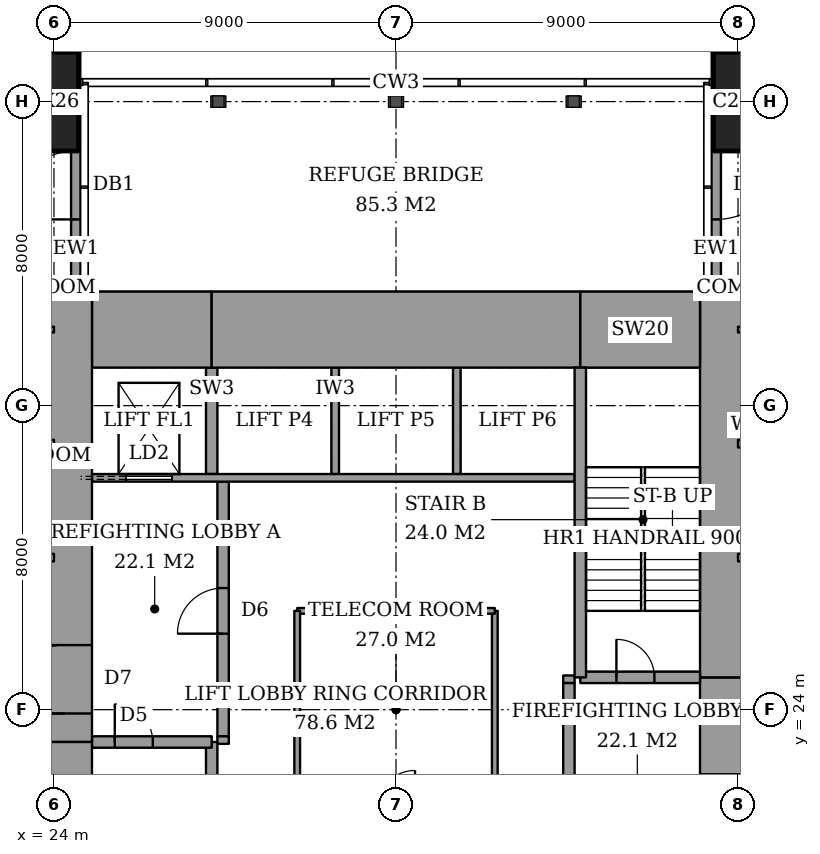
"""IFC4 building model, lengths in metres.
Left out: names, types, materials, properties, quantities, classifications, styles, units other than length and angle.
Written with IfcOpenShell. Run it as: python <this file> out.ifc"""

import sys

from ifc_helpers import new_model, si_unit, direction, frame, frame_2d, origin, origin_2d, place, context, subcontext, project, spatial, rectangle, extrude, element, fill, save


model = new_model("IFC4")
c1 = context("Model", 3, precision=1e-05, world=origin(), true_north=direction((0.0, 1.0)))
c2 = subcontext(c1, "Body", "Model", "MODEL_VIEW")
j1 = project(units=[si_unit("LENGTHUNIT", "METRE"), si_unit("PLANEANGLEUNIT", "RADIAN")], contexts=[c1])
p1 = place(None, origin())
s1 = spatial("IfcSite", under=j1, at=p1, CompositionType="ELEMENT")
p2 = place(p1, origin())
s2 = spatial("IfcBuilding", under=s1, at=p2, CompositionType="ELEMENT")
p3 = place(p2, frame((0.0, 0.0, 90.8)))
s3 = spatial("IfcBuildingStorey", under=s2, at=p3, CompositionType="ELEMENT", Elevation=90.8)
for number, where, z_axis, x_axis in (
    (1, (23.65, 40.0, 0.0), (0.0, 0.0, 1.0), (1.0, 0.0, 0.0)),
    (2, (42.35, 40.0, 0.0), (0.0, 0.0, 1.0), (1.0, 0.0, 0.0)),
):
    element("IfcColumn", number, at=place(p3, frame(where, z_axis=z_axis, x_axis=x_axis)), inside=s3, PredefinedType="COLUMN", context=c2, shape_type="SweptSolid", body=[
        extrude(rectangle(XDim=2.0, YDim=2.6, at=origin_2d()), origin(), (0.0, 0.0, 1.0), 5.4),
    ])
p4 = place(p3, frame((25.0, 34.0, 0.0), z_axis=(0.0, 0.0, 1.0), x_axis=(1.0, 0.0, 0.0)))
e3 = element("IfcWall", 3, at=p4, inside=s3, PredefinedType="SHEAR", context=c2, shape_type="SweptSolid", body=[
    extrude(rectangle(XDim=3.15, YDim=2.0, at=frame_2d((1.575, 0.0))), origin(), (0.0, 0.0, 1.0), 5.4),
])
p5 = place(p3, frame((28.15, 34.0, 0.0), z_axis=(0.0, 0.0, 1.0), x_axis=(1.0, 0.0, 0.0)))
e4 = element("IfcWall", 4, at=p5, inside=s3, PredefinedType="SHEAR", context=c2, shape_type="SweptSolid", body=[
    extrude(rectangle(XDim=9.7, YDim=2.0, at=frame_2d((4.85, 0.0))), origin(), (0.0, 0.0, 1.0), 5.4),
])
p6 = place(p3, frame((37.85, 34.0, 0.0), z_axis=(0.0, 0.0, 1.0), x_axis=(1.0, 0.0, 0.0)))
e5 = element("IfcWall", 5, at=p6, inside=s3, PredefinedType="SHEAR", context=c2, shape_type="SweptSolid", body=[
    extrude(rectangle(XDim=3.15, YDim=2.0, at=frame_2d((1.575, 0.0))), origin(), (0.0, 0.0, 1.0), 5.4),
])
p7 = place(p3, frame((24.3, 13.0, 0.0), z_axis=(0.0, 0.0, 1.0), x_axis=(0.0, 1.0, 0.0)))
e6 = element("IfcWall", 6, at=p7, inside=s3, PredefinedType="SHEAR", context=c2, shape_type="SweptSolid", body=[
    extrude(rectangle(XDim=10.15, YDim=1.4, at=frame_2d((5.075, 0.0))), origin(), (0.0, 0.0, 1.0), 5.4),
])
p8 = place(p3, frame((24.3, 23.15, 0.0), z_axis=(0.0, 0.0, 1.0), x_axis=(0.0, 1.0, 0.0)))
e7 = element("IfcWall", 7, at=p8, inside=s3, PredefinedType="SHEAR", context=c2, shape_type="SweptSolid", body=[
    extrude(rectangle(XDim=11.85, YDim=1.4, at=frame_2d((5.925, 0.0))), origin(), (0.0, 0.0, 1.0), 5.4),
])
p9 = place(p8, frame((0.75, 0.0, 0.0)))
e8 = element("IfcOpeningElement", 8, at=p9, cuts=e7, PredefinedType="OPENING", context=c2, shape_type="SweptSolid", body=[
    extrude(rectangle(XDim=1.8, YDim=2.4, at=frame_2d((0.9, 1.2))), frame((0.0, 0.71, 0.0), z_axis=(0.0, -1.0, 0.0), x_axis=(1.0, 0.0, 0.0)), (0.0, 0.0, 1.0), 1.42),
])
p10 = place(p3, frame((41.7, 13.0, 0.0), z_axis=(0.0, 0.0, 1.0), x_axis=(0.0, 1.0, 0.0)))
e9 = element("IfcWall", 9, at=p10, inside=s3, PredefinedType="SHEAR", context=c2, shape_type="SweptSolid", body=[
    extrude(rectangle(XDim=11.85, YDim=1.4, at=frame_2d((5.925, 0.0))), origin(), (0.0, 0.0, 1.0), 5.4),
])
p11 = place(p10, frame((7.5, 0.0, 0.0)))
e10 = element("IfcOpeningElement", 10, at=p11, cuts=e9, PredefinedType="OPENING", context=c2, shape_type="SweptSolid", body=[
    extrude(rectangle(XDim=1.8, YDim=2.4, at=frame_2d((0.9, 1.2))), frame((0.0, 0.71, 0.0), z_axis=(0.0, -1.0, 0.0), x_axis=(1.0, 0.0, 0.0)), (0.0, 0.0, 1.0), 1.42),
])
p12 = place(p3, frame((41.7, 24.85, 0.0), z_axis=(0.0, 0.0, 1.0), x_axis=(0.0, 1.0, 0.0)))
e11 = element("IfcWall", 11, at=p12, inside=s3, PredefinedType="SHEAR", context=c2, shape_type="SweptSolid", body=[
    extrude(rectangle(XDim=10.15, YDim=1.4, at=frame_2d((5.075, 0.0))), origin(), (0.0, 0.0, 1.0), 5.4),
])
p13 = place(p3, frame((28.15, 15.0, 0.0), z_axis=(0.0, 0.0, 1.0), x_axis=(0.0, 1.0, 0.0)))
e12 = element("IfcWall", 12, at=p13, inside=s3, PredefinedType="SHEAR", context=c2, shape_type="SweptSolid", body=[
    extrude(rectangle(XDim=8.15, YDim=0.3, at=frame_2d((4.075, 0.0))), origin(), (0.0, 0.0, 1.0), 5.4),
])
p14 = place(p3, frame((25.0, 23.15, 0.0), z_axis=(0.0, 0.0, 1.0), x_axis=(1.0, 0.0, 0.0)))
e13 = element("IfcWall", 13, at=p14, inside=s3, PredefinedType="SHEAR", context=c2, shape_type="SweptSolid", body=[
    extrude(rectangle(XDim=3.15, YDim=0.3, at=frame_2d((1.575, 0.0))), origin(), (0.0, 0.0, 1.0), 5.4),
])
p15 = place(p14, frame((0.6, 0.0, 0.0)))
e14 = element("IfcOpeningElement", 14, at=p15, cuts=e13, PredefinedType="OPENING", context=c2, shape_type="SweptSolid", body=[
    extrude(rectangle(XDim=1.0, YDim=2.1, at=frame_2d((0.5, 1.05))), frame((0.0, 0.16, 0.0), z_axis=(0.0, -1.0, 0.0), x_axis=(1.0, 0.0, 0.0)), (0.0, 0.0, 1.0), 0.32),
])
p16 = place(p3, frame((37.85, 24.85, 0.0), z_axis=(0.0, 0.0, 1.0), x_axis=(0.0, 1.0, 0.0)))
e15 = element("IfcWall", 15, at=p16, inside=s3, PredefinedType="SHEAR", context=c2, shape_type="SweptSolid", body=[
    extrude(rectangle(XDim=8.15, YDim=0.3, at=frame_2d((4.075, 0.0))), origin(), (0.0, 0.0, 1.0), 5.4),
])
p17 = place(p3, frame((37.85, 24.85, 0.0), z_axis=(0.0, 0.0, 1.0), x_axis=(1.0, 0.0, 0.0)))
e16 = element("IfcWall", 16, at=p17, inside=s3, PredefinedType="SHEAR", context=c2, shape_type="SweptSolid", body=[
    extrude(rectangle(XDim=3.15, YDim=0.3, at=frame_2d((1.575, 0.0))), origin(), (0.0, 0.0, 1.0), 5.4),
])
p18 = place(p17, frame((0.95, 0.0, 0.0)))
e17 = element("IfcOpeningElement", 17, at=p18, cuts=e16, PredefinedType="OPENING", context=c2, shape_type="SweptSolid", body=[
    extrude(rectangle(XDim=1.0, YDim=2.1, at=frame_2d((0.5, 1.05))), frame((0.0, 0.16, 0.0), z_axis=(0.0, -1.0, 0.0), x_axis=(1.0, 0.0, 0.0)), (0.0, 0.0, 1.0), 0.32),
])
p19 = place(p3, frame((28.45, 23.3, 0.0), z_axis=(0.0, 0.0, 1.0), x_axis=(0.0, 1.0, 0.0)))
e18 = element("IfcWall", 18, at=p19, inside=s3, PredefinedType="PARTITIONING", context=c2, shape_type="SweptSolid", body=[
    extrude(rectangle(XDim=6.7, YDim=0.3, at=frame_2d((3.35, 0.0))), origin(), (0.0, 0.0, 1.0), 5.4),
])
p20 = place(p19, frame((2.7, 0.0, 0.0)))
e19 = element("IfcOpeningElement", 19, at=p20, cuts=e18, PredefinedType="OPENING", context=c2, shape_type="SweptSolid", body=[
    extrude(rectangle(XDim=1.2, YDim=2.1, at=frame_2d((0.6, 1.05))), frame((0.0, 0.16, 0.0), z_axis=(0.0, -1.0, 0.0), x_axis=(1.0, 0.0, 0.0)), (0.0, 0.0, 1.0), 0.32),
])
p21 = place(p3, frame((37.55, 18.0, 0.0), z_axis=(0.0, 0.0, 1.0), x_axis=(0.0, 1.0, 0.0)))
e20 = element("IfcWall", 20, at=p21, inside=s3, PredefinedType="PARTITIONING", context=c2, shape_type="SweptSolid", body=[
    extrude(rectangle(XDim=6.7, YDim=0.3, at=frame_2d((3.35, 0.0))), origin(), (0.0, 0.0, 1.0), 5.4),
])
p22 = place(p21, frame((2.8, 0.0, 0.0)))
e21 = element("IfcOpeningElement", 21, at=p22, cuts=e20, PredefinedType="OPENING", context=c2, shape_type="SweptSolid", body=[
    extrude(rectangle(XDim=1.2, YDim=2.1, at=frame_2d((0.6, 1.05))), frame((0.0, 0.16, 0.0), z_axis=(0.0, -1.0, 0.0), x_axis=(1.0, 0.0, 0.0)), (0.0, 0.0, 1.0), 0.32),
])
p23 = place(p3, frame((41.425, 40.6, 0.0), z_axis=(0.0, 0.0, 1.0), x_axis=(0.0, -1.0, 0.0)))
e22 = element("IfcWall", 22, at=p23, inside=s3, PredefinedType="SOLIDWALL", context=c2, shape_type="SweptSolid", body=[
    extrude(rectangle(XDim=5.6, YDim=0.25, at=frame_2d((2.8, 0.0))), origin(), (0.0, 0.0, 1.0), 5.4),
])
p24 = place(p23, frame((1.9, 0.0, 0.0)))
e23 = element("IfcOpeningElement", 23, at=p24, cuts=e22, PredefinedType="OPENING", context=c2, shape_type="SweptSolid", body=[
    extrude(rectangle(XDim=1.8, YDim=2.4, at=frame_2d((0.9, 1.2))), frame((0.0, 0.135, 0.0), z_axis=(0.0, -1.0, 0.0), x_axis=(1.0, 0.0, 0.0)), (0.0, 0.0, 1.0), 0.27),
])
p25 = place(p3, frame((24.575, 35.0, 0.0), z_axis=(0.0, 0.0, 1.0), x_axis=(0.0, 1.0, 0.0)))
e24 = element("IfcWall", 24, at=p25, inside=s3, PredefinedType="SOLIDWALL", context=c2, shape_type="SweptSolid", body=[
    extrude(rectangle(XDim=5.6, YDim=0.25, at=frame_2d((2.8, 0.0))), origin(), (0.0, 0.0, 1.0), 5.4),
])
p26 = place(p25, frame((1.9, 0.0, 0.0)))
e25 = element("IfcOpeningElement", 25, at=p26, cuts=e24, PredefinedType="OPENING", context=c2, shape_type="SweptSolid", body=[
    extrude(rectangle(XDim=1.8, YDim=2.4, at=frame_2d((0.9, 1.2))), frame((0.0, 0.135, 0.0), z_axis=(0.0, -1.0, 0.0), x_axis=(1.0, 0.0, 0.0)), (0.0, 0.0, 1.0), 0.27),
])
for number, where, z_axis, x_axis in (
    (26, (18.9, 28.0, 0.0), (0.0, 0.0, 1.0), (1.0, 0.0, 0.0)),
    (27, (42.0, 28.0, 0.0), (0.0, 0.0, 1.0), (1.0, 0.0, 0.0)),
    (28, (18.9, 31.0, 0.0), (0.0, 0.0, 1.0), (1.0, 0.0, 0.0)),
    (29, (42.0, 31.0, 0.0), (0.0, 0.0, 1.0), (1.0, 0.0, 0.0)),
):
    element("IfcWall", number, at=place(p3, frame(where, z_axis=z_axis, x_axis=x_axis)), inside=s3, PredefinedType="PARTITIONING", context=c2, shape_type="SweptSolid", body=[
        extrude(rectangle(XDim=5.1, YDim=0.2, at=frame_2d((2.55, 0.0))), origin(), (0.0, 0.0, 1.0), 5.15),
    ])
p27 = place(p3, frame((12.0, 34.0, 0.0), z_axis=(0.0, 0.0, 1.0), x_axis=(1.0, 0.0, 0.0)))
e30 = element("IfcWall", 30, at=p27, inside=s3, PredefinedType="PARTITIONING", context=c2, shape_type="SweptSolid", body=[
    extrude(rectangle(XDim=12.0, YDim=0.15, at=frame_2d((6.0, 0.0))), origin(), (0.0, 0.0, 1.0), 5.15),
])
p28 = place(p27, frame((1.65, 0.0, 0.0)))
e31 = element("IfcOpeningElement", 31, at=p28, cuts=e30, PredefinedType="OPENING", context=c2, shape_type="SweptSolid", body=[
    extrude(rectangle(XDim=1.0, YDim=2.1, at=frame_2d((0.5, 1.05))), frame((0.0, 0.085, 0.0), z_axis=(0.0, -1.0, 0.0), x_axis=(1.0, 0.0, 0.0)), (0.0, 0.0, 1.0), 0.17),
])
p29 = place(p3, frame((42.0, 34.0, 0.0), z_axis=(0.0, 0.0, 1.0), x_axis=(1.0, 0.0, 0.0)))
e32 = element("IfcWall", 32, at=p29, inside=s3, PredefinedType="PARTITIONING", context=c2, shape_type="SweptSolid", body=[
    extrude(rectangle(XDim=12.0, YDim=0.15, at=frame_2d((6.0, 0.0))), origin(), (0.0, 0.0, 1.0), 5.15),
])
p30 = place(p29, frame((9.35, 0.0, 0.0)))
e33 = element("IfcOpeningElement", 33, at=p30, cuts=e32, PredefinedType="OPENING", context=c2, shape_type="SweptSolid", body=[
    extrude(rectangle(XDim=1.0, YDim=2.1, at=frame_2d((0.5, 1.05))), frame((0.0, 0.085, 0.0), z_axis=(0.0, -1.0, 0.0), x_axis=(1.0, 0.0, 0.0)), (0.0, 0.0, 1.0), 0.17),
])
p31 = place(p3, frame((25.0, 30.1, 0.0), z_axis=(0.0, 0.0, 1.0), x_axis=(1.0, 0.0, 0.0)))
e34 = element("IfcWall", 34, at=p31, inside=s3, PredefinedType="PARTITIONING", context=c2, shape_type="SweptSolid", body=[
    extrude(rectangle(XDim=12.7, YDim=0.2, at=frame_2d((6.35, 0.0))), origin(), (0.0, 0.0, 1.0), 5.4),
])
p32 = place(p31, frame((0.9, 0.0, 0.0)))
e35 = element("IfcOpeningElement", 35, at=p32, cuts=e34, PredefinedType="OPENING", context=c2, shape_type="SweptSolid", body=[
    extrude(rectangle(XDim=1.2, YDim=2.1, at=frame_2d((0.6, 1.05))), frame((0.0, 0.11, 0.0), z_axis=(0.0, -1.0, 0.0), x_axis=(1.0, 0.0, 0.0)), (0.0, 0.0, 1.0), 0.22),
])
for number, where, z_axis, x_axis in (
    (36, (31.4, 30.2, 0.0), (0.0, 0.0, 1.0), (0.0, 1.0, 0.0)),
    (37, (34.6, 30.2, 0.0), (0.0, 0.0, 1.0), (0.0, 1.0, 0.0)),
):
    element("IfcWall", number, at=place(p3, frame(where, z_axis=z_axis, x_axis=x_axis)), inside=s3, PredefinedType="PARTITIONING", context=c2, shape_type="SweptSolid", body=[
        extrude(rectangle(XDim=2.8, YDim=0.2, at=frame_2d((1.4, 0.0))), origin(), (0.0, 0.0, 1.0), 5.4),
    ])
p33 = place(p3, frame((28.15, 30.2, 0.0), z_axis=(0.0, 0.0, 1.0), x_axis=(0.0, 1.0, 0.0)))
e38 = element("IfcWall", 38, at=p33, inside=s3, PredefinedType="SHEAR", context=c2, shape_type="SweptSolid", body=[
    extrude(rectangle(XDim=2.8, YDim=0.3, at=frame_2d((1.4, 0.0))), origin(), (0.0, 0.0, 1.0), 5.4),
])
for number, where, z_axis, x_axis in (
    (39, (28.3, 23.2, 0.0), (0.0, 0.0, 1.0), (1.0, 0.0, 0.0)),
    (40, (37.4, 24.8, 0.0), (0.0, 0.0, 1.0), (1.0, 0.0, 0.0)),
):
    element("IfcWall", number, at=place(p3, frame(where, z_axis=z_axis, x_axis=x_axis)), inside=s3, PredefinedType="PARTITIONING", context=c2, shape_type="SweptSolid", body=[
        extrude(rectangle(XDim=0.3, YDim=0.2, at=frame_2d((0.15, 0.0))), origin(), (0.0, 0.0, 1.0), 5.4),
    ])
for number, where, z_axis, x_axis in (
    (41, (30.4, 26.6, 0.0), (0.0, 0.0, 1.0), (1.0, 0.0, 0.0)),
    (42, (30.4, 21.4, 0.0), (0.0, 0.0, 1.0), (0.0, 1.0, 0.0)),
    (43, (35.6, 21.4, 0.0), (0.0, 0.0, 1.0), (0.0, 1.0, 0.0)),
):
    element("IfcWall", number, at=place(p3, frame(where, z_axis=z_axis, x_axis=x_axis)), inside=s3, PredefinedType="PARTITIONING", context=c2, shape_type="SweptSolid", body=[
        extrude(rectangle(XDim=5.2, YDim=0.15, at=frame_2d((2.6, 0.0))), origin(), (0.0, 0.0, 1.0), 5.15),
    ])
p34 = place(p24, origin())
e44 = element("IfcDoor", 44, at=p34, inside=s3, OperationType="DOUBLE_DOOR_DOUBLE_SWING", PredefinedType="DOOR", context=c2, shape_type="SweptSolid", body=[
    extrude(rectangle(XDim=1.8, YDim=2.4, at=frame_2d((0.9, 1.2))), frame((0.0, 0.025, 0.0), z_axis=(0.0, -1.0, 0.0), x_axis=(1.0, 0.0, 0.0)), (0.0, 0.0, 1.0), 0.05),
])
fill(e23, e44)
p35 = place(p26, origin())
e45 = element("IfcDoor", 45, at=p35, inside=s3, OperationType="DOUBLE_DOOR_DOUBLE_SWING", PredefinedType="DOOR", context=c2, shape_type="SweptSolid", body=[
    extrude(rectangle(XDim=1.8, YDim=2.4, at=frame_2d((0.9, 1.2))), frame((0.0, 0.025, 0.0), z_axis=(0.0, -1.0, 0.0), x_axis=(1.0, 0.0, 0.0)), (0.0, 0.0, 1.0), 0.05),
])
fill(e25, e45)
p36 = place(p15, origin())
e46 = element("IfcDoor", 46, at=p36, inside=s3, OperationType="SINGLE_SWING_RIGHT", PredefinedType="DOOR", context=c2, shape_type="SweptSolid", body=[
    extrude(rectangle(XDim=1.0, YDim=2.1, at=frame_2d((0.5, 1.05))), frame((0.0, 0.025, 0.0), z_axis=(0.0, -1.0, 0.0), x_axis=(1.0, 0.0, 0.0)), (0.0, 0.0, 1.0), 0.05),
])
fill(e14, e46)
p37 = place(p18, origin())
e47 = element("IfcDoor", 47, at=p37, inside=s3, OperationType="SINGLE_SWING_RIGHT", PredefinedType="DOOR", context=c2, shape_type="SweptSolid", body=[
    extrude(rectangle(XDim=1.0, YDim=2.1, at=frame_2d((0.5, 1.05))), frame((0.0, 0.025, 0.0), z_axis=(0.0, -1.0, 0.0), x_axis=(1.0, 0.0, 0.0)), (0.0, 0.0, 1.0), 0.05),
])
fill(e17, e47)
p38 = place(p20, origin())
e48 = element("IfcDoor", 48, at=p38, inside=s3, OperationType="SINGLE_SWING_RIGHT", PredefinedType="DOOR", context=c2, shape_type="SweptSolid", body=[
    extrude(rectangle(XDim=1.2, YDim=2.1, at=frame_2d((0.6, 1.05))), frame((0.0, 0.025, 0.0), z_axis=(0.0, -1.0, 0.0), x_axis=(1.0, 0.0, 0.0)), (0.0, 0.0, 1.0), 0.05),
])
fill(e19, e48)
p39 = place(p9, origin())
e49 = element("IfcDoor", 49, at=p39, inside=s3, OperationType="DOUBLE_DOOR_DOUBLE_SWING", PredefinedType="DOOR", context=c2, shape_type="SweptSolid", body=[
    extrude(rectangle(XDim=1.8, YDim=2.4, at=frame_2d((0.9, 1.2))), frame((0.0, 0.025, 0.0), z_axis=(0.0, -1.0, 0.0), x_axis=(1.0, 0.0, 0.0)), (0.0, 0.0, 1.0), 0.05),
])
fill(e8, e49)
p40 = place(p32, origin())
e50 = element("IfcDoor", 50, at=p40, inside=s3, OperationType="SLIDING_TO_LEFT", PredefinedType="DOOR", context=c2, shape_type="SweptSolid", body=[
    extrude(rectangle(XDim=1.2, YDim=2.1, at=frame_2d((0.6, 1.05))), frame((0.0, 0.025, 0.0), z_axis=(0.0, -1.0, 0.0), x_axis=(1.0, 0.0, 0.0)), (0.0, 0.0, 1.0), 0.05),
])
fill(e35, e50)
save(model, sys.argv[1])
